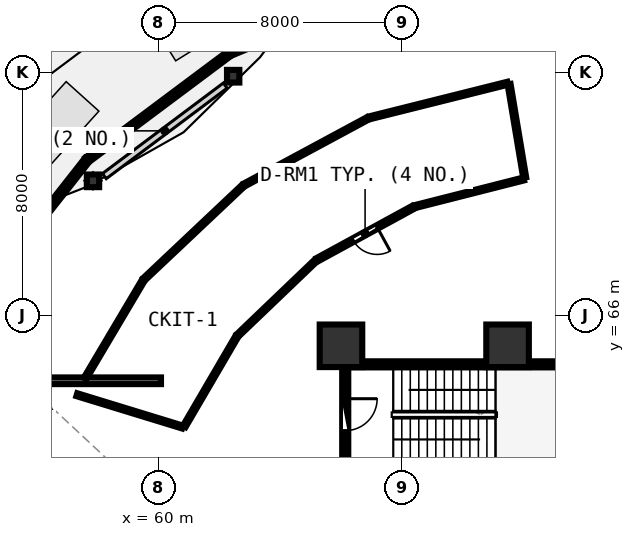
"""IFC4 building model, lengths in metres.
Left out: names, types, materials, properties, quantities, classifications, styles, units other than length and angle.
Written with IfcOpenShell. Run it as: python <this file> out.ifc"""

import sys

from ifc_helpers import new_model, si_unit, direction, frame, frame_2d, origin, origin_2d, place, context, subcontext, project, spatial, rectangle, i_section, extrude, element, fill, save


model = new_model("IFC4")
c1 = context("Model", 3, precision=1e-05, world=origin(), true_north=direction((0.0, 1.0)))
c2 = subcontext(c1, "Body", "Model", "MODEL_VIEW")
j1 = project(units=[si_unit("LENGTHUNIT", "METRE"), si_unit("PLANEANGLEUNIT", "RADIAN")], contexts=[c1])
p1 = place(None, origin())
s1 = spatial("IfcSite", under=j1, at=p1, CompositionType="ELEMENT")
p2 = place(p1, origin())
s2 = spatial("IfcBuilding", under=s1, at=p2, CompositionType="ELEMENT")
p3 = place(p2, origin())
s3 = spatial("IfcBuildingStorey", under=s2, at=p3, CompositionType="ELEMENT", Elevation=0.0)
for number, where, z_axis, x_axis in (
    (1, (71.48, 65.0, 0.0), (0.0, 0.0, 1.0), (1.0, 0.0, 0.0)),
    (2, (66.0, 65.0, 0.0), (0.0, 0.0, 1.0), (1.0, 0.0, 0.0)),
):
    element("IfcColumn", number, at=place(p3, frame(where, z_axis=z_axis, x_axis=x_axis)), inside=s3, PredefinedType="PILASTER", context=c2, shape_type="SweptSolid", body=[
        extrude(rectangle(XDim=1.4, YDim=1.4, at=origin_2d()), origin(), (0.0, 0.0, 1.0), 4.5),
    ])
for number, where, z_axis, x_axis in (
    (3, (62.454, 73.866, 0.0), (0.0, 0.0, 1.0), (1.0, 0.0, 0.0)),
    (4, (57.844, 70.426, 0.0), (0.0, 0.0, 1.0), (1.0, 0.0, 0.0)),
):
    element("IfcColumn", number, at=place(p3, frame(where, z_axis=z_axis, x_axis=x_axis)), inside=s3, PredefinedType="COLUMN", context=c2, shape_type="SweptSolid", body=[
        extrude(i_section(OverallWidth=0.406, OverallDepth=0.416, WebThickness=0.029, FlangeThickness=0.048, FilletRadius=0.015, at=origin_2d()), origin(), (0.0, 0.0, 1.0), 4.5),
    ])
p4 = place(p3, frame((67.202, 76.641, 0.0), z_axis=(0.0, 0.0, 1.0), x_axis=(-0.923474464617, -0.383659892614, 0.0)))
e5 = element("IfcWall", 5, at=p4, inside=s3, PredefinedType="PARAPET", context=c2, shape_type="SweptSolid", body=[
    extrude(rectangle(XDim=5.263, YDim=0.19, at=frame_2d((2.631, 0.0))), origin(), (0.0, 0.0, 1.0), 0.62),
])
p5 = place(p3, frame((62.342, 74.622, 0.0), z_axis=(0.0, 0.0, 1.0), x_axis=(-0.800949430728, -0.59873200133, 0.0)))
e6 = element("IfcWall", 6, at=p5, inside=s3, PredefinedType="PARAPET", context=c2, shape_type="SweptSolid", body=[
    extrude(rectangle(XDim=5.857, YDim=0.19, at=frame_2d((2.928, 0.0))), origin(), (0.0, 0.0, 1.0), 0.62),
])
p6 = place(p3, frame((57.651, 71.115, 0.0), z_axis=(0.0, 0.0, 1.0), x_axis=(-0.617936357215, -0.786228121115, 0.0)))
e7 = element("IfcWall", 7, at=p6, inside=s3, PredefinedType="PARAPET", context=c2, shape_type="SweptSolid", body=[
    extrude(rectangle(XDim=4.977, YDim=0.19, at=frame_2d((2.489, 0.0))), origin(), (0.0, 0.0, 1.0), 0.62),
])
p7 = place(p3, frame((73.42, 64.39, 0.0), z_axis=(0.0, 0.0, 1.0), x_axis=(-1.0, 0.0, 0.0)))
e8 = element("IfcWall", 8, at=p7, inside=s3, PredefinedType="SHEAR", context=c2, shape_type="SweptSolid", body=[
    extrude(rectangle(XDim=7.16, YDim=0.2, at=frame_2d((3.58, 0.0))), origin(), (0.0, 0.0, 1.0), 4.2),
])
p8 = place(p3, frame((66.14, 64.27, 0.0), z_axis=(0.0, 0.0, 1.0), x_axis=(0.0, -1.0, 0.0)))
e9 = element("IfcWall", 9, at=p8, inside=s3, PredefinedType="SHEAR", context=c2, shape_type="SweptSolid", body=[
    extrude(rectangle(XDim=3.07, YDim=0.2, at=frame_2d((1.535, 0.0))), origin(), (0.0, 0.0, 1.0), 4.2),
])
p9 = place(p8, frame((1.01, 0.0, 0.0)))
e10 = element("IfcOpeningElement", 10, at=p9, cuts=e9, PredefinedType="OPENING", context=c2, shape_type="SweptSolid", body=[
    extrude(rectangle(XDim=1.05, YDim=2.1, at=frame_2d((0.525, 1.05))), frame((0.0, 0.11, 0.0), z_axis=(0.0, -1.0, 0.0), x_axis=(1.0, 0.0, 0.0)), (0.0, 0.0, 1.0), 0.22),
])
p10 = place(p3, frame((47.32, 63.85, 0.0), z_axis=(0.0, 0.0, 1.0), x_axis=(1.0, 0.0, 0.0)))
e11 = element("IfcWall", 11, at=p10, inside=s3, PredefinedType="SOLIDWALL", context=c2, shape_type="SweptSolid", body=[
    extrude(rectangle(XDim=12.76, YDim=0.22, at=frame_2d((6.38, 0.0))), origin(), (0.0, 0.0, 1.0), 3.585),
])
p11 = place(p3, frame((68.357, 69.544, 0.0), z_axis=(0.0, 0.0, 1.0), x_axis=(-0.877746280932, -0.479125731212, 0.0)))
e12 = element("IfcWall", 12, at=p11, inside=s3, PredefinedType="PARTITIONING", context=c2, shape_type="SweptSolid", body=[
    extrude(rectangle(XDim=3.563, YDim=0.12, at=frame_2d((1.782, 0.0))), origin(), (0.0, 0.0, 1.0), 4.19),
])
p12 = place(p11, frame((1.332, 0.0, 0.0)))
e13 = element("IfcOpeningElement", 13, at=p12, cuts=e12, PredefinedType="OPENING", context=c2, shape_type="SweptSolid", body=[
    extrude(rectangle(XDim=0.9, YDim=2.08, at=frame_2d((0.45, 1.04))), frame((0.0, 0.07, 0.0), z_axis=(0.0, -1.0, 0.0), x_axis=(1.0, 0.0, 0.0)), (0.0, 0.0, 1.0), 0.14),
])
p13 = place(p3, frame((72.01, 70.487, 0.0), z_axis=(0.0, 0.0, 1.0), x_axis=(-0.969229007952, -0.246160781085, 0.0)))
e14 = element("IfcWall", 14, at=p13, inside=s3, PredefinedType="PARTITIONING", context=c2, shape_type="SweptSolid", body=[
    extrude(rectangle(XDim=3.675, YDim=0.1, at=frame_2d((1.837, 0.0))), origin(), (0.0, 0.0, 1.0), 3.585),
])
p14 = place(p3, frame((65.148, 67.78, 0.0), z_axis=(0.0, 0.0, 1.0), x_axis=(-0.722428617801, -0.691445509192, 0.0)))
e15 = element("IfcWall", 15, at=p14, inside=s3, PredefinedType="PARTITIONING", context=c2, shape_type="SweptSolid", body=[
    extrude(rectangle(XDim=3.507, YDim=0.1, at=frame_2d((1.753, 0.0))), origin(), (0.0, 0.0, 1.0), 3.585),
])
p15 = place(p3, frame((62.566, 65.293, 0.0), z_axis=(0.0, 0.0, 1.0), x_axis=(-0.504538896435, -0.863388963321, 0.0)))
e16 = element("IfcWall", 16, at=p15, inside=s3, PredefinedType="PARTITIONING", context=c2, shape_type="SweptSolid", body=[
    extrude(rectangle(XDim=3.408, YDim=0.1, at=frame_2d((1.704, 0.0))), origin(), (0.0, 0.0, 1.0), 3.585),
])
p16 = place(p3, frame((60.788, 62.328, 0.0), z_axis=(0.0, 0.0, 1.0), x_axis=(-0.95616581323, 0.292825780302, 0.0)))
e17 = element("IfcWall", 17, at=p16, inside=s3, PredefinedType="PARTITIONING", context=c2, shape_type="SweptSolid", body=[
    extrude(rectangle(XDim=3.636, YDim=0.1, at=frame_2d((1.818, 0.0))), origin(), (0.0, 0.0, 1.0), 3.945),
])
p17 = place(p3, frame((57.582, 63.925, 0.0), z_axis=(0.0, 0.0, 1.0), x_axis=(0.510042246843, 0.860149351238, 0.0)))
e18 = element("IfcWall", 18, at=p17, inside=s3, PredefinedType="PARTITIONING", context=c2, shape_type="SweptSolid", body=[
    extrude(rectangle(XDim=3.738, YDim=0.1, at=frame_2d((1.869, 0.0))), origin(), (0.0, 0.0, 1.0), 3.585),
])
p18 = place(p3, frame((59.538, 67.202, 0.0), z_axis=(0.0, 0.0, 1.0), x_axis=(0.727255441207, 0.686366901325, 0.0)))
e19 = element("IfcWall", 19, at=p18, inside=s3, PredefinedType="PARTITIONING", context=c2, shape_type="SweptSolid", body=[
    extrude(rectangle(XDim=4.442, YDim=0.1, at=frame_2d((2.221, 0.0))), origin(), (0.0, 0.0, 1.0), 3.585),
])
p19 = place(p3, frame((62.833, 70.298, 0.0), z_axis=(0.0, 0.0, 1.0), x_axis=(0.880380395475, 0.474268235562, 0.0)))
e20 = element("IfcWall", 20, at=p19, inside=s3, PredefinedType="PARTITIONING", context=c2, shape_type="SweptSolid", body=[
    extrude(rectangle(XDim=4.582, YDim=0.1, at=frame_2d((2.291, 0.0))), origin(), (0.0, 0.0, 1.0), 3.585),
])
p20 = place(p3, frame((66.941, 72.5, 0.0), z_axis=(0.0, 0.0, 1.0), x_axis=(0.970108758835, 0.242670550399, 0.0)))
e21 = element("IfcWall", 21, at=p20, inside=s3, PredefinedType="PARTITIONING", context=c2, shape_type="SweptSolid", body=[
    extrude(rectangle(XDim=4.683, YDim=0.1, at=frame_2d((2.342, 0.0))), origin(), (0.0, 0.0, 1.0), 3.585),
])
p21 = place(p3, frame((71.53, 73.606, 0.0), z_axis=(0.0, 0.0, 1.0), x_axis=(0.164806022155, -0.98632599837, 0.0)))
e22 = element("IfcWall", 22, at=p21, inside=s3, PredefinedType="PARTITIONING", context=c2, shape_type="SweptSolid", body=[
    extrude(rectangle(XDim=3.112, YDim=0.1, at=frame_2d((1.556, 0.0))), origin(), (0.0, 0.0, 1.0), 3.945),
])
p22 = place(p9, origin())
e23 = element("IfcDoor", 23, at=p22, inside=s3, OperationType="SINGLE_SWING_LEFT", PredefinedType="DOOR", context=c2, shape_type="SweptSolid", body=[
    extrude(rectangle(XDim=1.05, YDim=2.1, at=frame_2d((0.525, 1.05))), frame((0.0, 0.025, 0.0), z_axis=(0.0, -1.0, 0.0), x_axis=(1.0, 0.0, 0.0)), (0.0, 0.0, 1.0), 0.05),
])
fill(e10, e23)
p23 = place(p12, origin())
e24 = element("IfcDoor", 24, at=p23, inside=s3, OperationType="SINGLE_SWING_LEFT", PredefinedType="DOOR", context=c2, shape_type="SweptSolid", body=[
    extrude(rectangle(XDim=0.9, YDim=2.08, at=frame_2d((0.45, 1.04))), frame((0.0, 0.025, 0.0), z_axis=(0.0, -1.0, 0.0), x_axis=(1.0, 0.0, 0.0)), (0.0, 0.0, 1.0), 0.05),
])
fill(e13, e24)
save(model, sys.argv[1])
